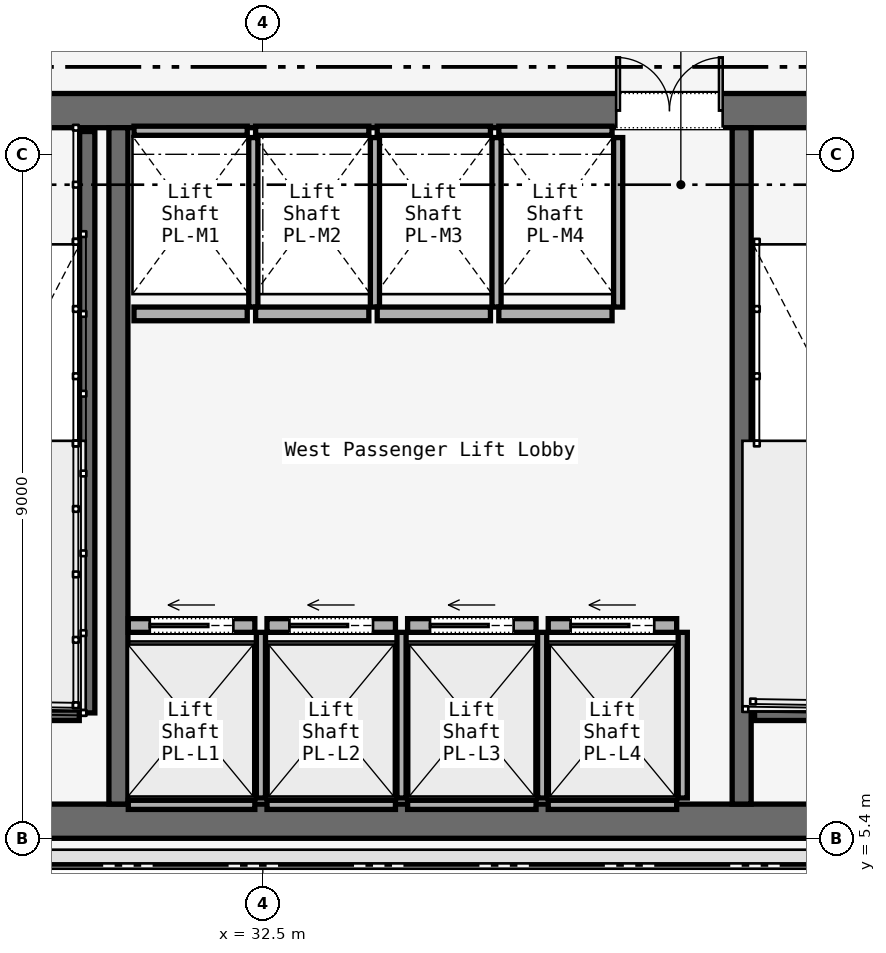
"""IFC4 building model, lengths in metres.
Left out: names, types, materials, properties, quantities, classifications, styles, units other than length and angle.
Written with IfcOpenShell. Run it as: python <this file> out.ifc"""

import sys

from ifc_helpers import new_model, si_unit, direction, frame, frame_2d, origin, place, context, subcontext, project, spatial, rectangle, extrude, element, fill, save


model = new_model("IFC4")
c1 = context("Model", 3, precision=1e-05, world=origin(), true_north=direction((0.0, 1.0)))
c2 = subcontext(c1, "Body", "Model", "MODEL_VIEW")
j1 = project(units=[si_unit("LENGTHUNIT", "METRE"), si_unit("PLANEANGLEUNIT", "RADIAN")], contexts=[c1])
p1 = place(None, origin())
s1 = spatial("IfcSite", under=j1, at=p1, CompositionType="ELEMENT")
p2 = place(p1, origin())
s2 = spatial("IfcBuilding", under=s1, at=p2, CompositionType="ELEMENT")
p3 = place(p2, frame((0.0, 0.0, 36.0)))
s3 = spatial("IfcBuildingStorey", under=s2, at=p3, CompositionType="ELEMENT", Elevation=36.0)
p4 = place(p3, frame((26.45, 14.975, 0.0), z_axis=(0.0, 0.0, 1.0), x_axis=(1.0, 0.0, 0.0)))
e1 = element("IfcWall", 1, at=p4, inside=s3, PredefinedType="SOLIDWALL", context=c2, shape_type="SweptSolid", body=[
    extrude(rectangle(XDim=31.1, YDim=0.45, at=frame_2d((15.55, 0.0))), origin(), (0.0, 0.0, 1.0), 3.58),
])
p5 = place(p4, frame((1.65, 0.0, 0.0)))
e2 = element("IfcOpeningElement", 2, at=p5, cuts=e1, PredefinedType="OPENING", context=c2, shape_type="SweptSolid", body=[
    extrude(rectangle(XDim=1.1, YDim=2.2, at=frame_2d((0.55, 1.1))), frame((0.0, 0.225, 0.0), z_axis=(0.0, -1.0, 0.0), x_axis=(1.0, 0.0, 0.0)), (0.0, 0.0, 1.0), 0.45),
])
p6 = place(p4, frame((13.65, 0.0, 0.0)))
e3 = element("IfcOpeningElement", 3, at=p6, cuts=e1, PredefinedType="OPENING", context=c2, shape_type="SweptSolid", body=[
    extrude(rectangle(XDim=1.1, YDim=2.2, at=frame_2d((0.55, 1.1))), frame((0.0, 0.225, 0.0), z_axis=(0.0, -1.0, 0.0), x_axis=(1.0, 0.0, 0.0)), (0.0, 0.0, 1.0), 0.45),
])
p7 = place(p4, frame((25.55, 0.0, 0.0)))
e4 = element("IfcOpeningElement", 4, at=p7, cuts=e1, PredefinedType="OPENING", context=c2, shape_type="SweptSolid", body=[
    extrude(rectangle(XDim=1.1, YDim=2.2, at=frame_2d((0.55, 1.1))), frame((0.0, 0.225, 0.0), z_axis=(0.0, -1.0, 0.0), x_axis=(1.0, 0.0, 0.0)), (0.0, 0.0, 1.0), 0.45),
])
p8 = place(p4, frame((10.7, 0.0, 0.0)))
e5 = element("IfcOpeningElement", 5, at=p8, cuts=e1, PredefinedType="OPENING", context=c2, shape_type="SweptSolid", body=[
    extrude(rectangle(XDim=1.4, YDim=2.2, at=frame_2d((0.7, 1.1))), frame((0.0, 0.225, 0.0), z_axis=(0.0, -1.0, 0.0), x_axis=(1.0, 0.0, 0.0)), (0.0, 0.0, 1.0), 0.45),
])
p9 = place(p4, frame((19.35, 0.0, 0.0)))
e6 = element("IfcOpeningElement", 6, at=p9, cuts=e1, PredefinedType="OPENING", context=c2, shape_type="SweptSolid", body=[
    extrude(rectangle(XDim=1.1, YDim=2.2, at=frame_2d((0.55, 1.1))), frame((0.0, 0.225, 0.0), z_axis=(0.0, -1.0, 0.0), x_axis=(1.0, 0.0, 0.0)), (0.0, 0.0, 1.0), 0.45),
])
p10 = place(p4, frame((21.4, 0.0, 0.0)))
e7 = element("IfcOpeningElement", 7, at=p10, cuts=e1, PredefinedType="OPENING", context=c2, shape_type="SweptSolid", body=[
    extrude(rectangle(XDim=0.9, YDim=2.1, at=frame_2d((0.45, 1.05))), frame((0.0, 0.225, 0.0), z_axis=(0.0, -1.0, 0.0), x_axis=(1.0, 0.0, 0.0)), (0.0, 0.0, 1.0), 0.45),
])
p11 = place(p4, frame((23.35, 0.0, 0.0)))
e8 = element("IfcOpeningElement", 8, at=p11, cuts=e1, PredefinedType="OPENING", context=c2, shape_type="SweptSolid", body=[
    extrude(rectangle(XDim=1.3, YDim=2.3, at=frame_2d((0.65, 1.15))), frame((0.0, 0.225, 0.0), z_axis=(0.0, -1.0, 0.0), x_axis=(1.0, 0.0, 0.0)), (0.0, 0.0, 1.0), 0.45),
])
p12 = place(p3, frame((26.45, 5.625, 0.0), z_axis=(0.0, 0.0, 1.0), x_axis=(1.0, 0.0, 0.0)))
e9 = element("IfcWall", 9, at=p12, inside=s3, PredefinedType="SOLIDWALL", context=c2, shape_type="SweptSolid", body=[
    extrude(rectangle(XDim=31.1, YDim=0.45, at=frame_2d((15.55, 0.0))), origin(), (0.0, 0.0, 1.0), 3.58),
])
for number, where, z_axis, x_axis in (
    (10, (30.6, 5.85, 0.0), (0.0, 0.0, 1.0), (0.0, 1.0, 0.0)),
    (11, (38.8, 5.85, 0.0), (0.0, 0.0, 1.0), (0.0, 1.0, 0.0)),
):
    element("IfcWall", number, at=place(p3, frame(where, z_axis=z_axis, x_axis=x_axis)), inside=s3, PredefinedType="SOLIDWALL", context=c2, shape_type="SweptSolid", body=[
        extrude(rectangle(XDim=8.9, YDim=0.25, at=frame_2d((4.45, 0.0))), origin(), (0.0, 0.0, 1.0), 3.58),
    ])
p13 = place(p3, frame((30.19, 14.7, 0.0), z_axis=(0.0, 0.0, 1.0), x_axis=(0.0, -1.0, 0.0)))
e12 = element("IfcWall", 12, at=p13, inside=s3, PredefinedType="SOLIDWALL", context=c2, shape_type="SweptSolid", body=[
    extrude(rectangle(XDim=7.65, YDim=0.2, at=frame_2d((3.825, 0.0))), origin(), (0.0, 0.0, 1.0), 3.8),
])
for number, where, z_axis, x_axis in (
    (13, (26.97, 7.05, 0.0), (0.0, 0.0, 1.0), (1.0, 0.0, 0.0)),
    (14, (38.97, 7.05, 0.0), (0.0, 0.0, 1.0), (1.0, 0.0, 0.0)),
):
    element("IfcWall", number, at=place(p3, frame(where, z_axis=z_axis, x_axis=x_axis)), inside=s3, PredefinedType="SOLIDWALL", context=c2, shape_type="SweptSolid", body=[
        extrude(rectangle(XDim=3.115, YDim=0.2, at=frame_2d((1.558, 0.0))), origin(), (0.0, 0.0, 1.0), 3.8),
    ])
p14 = place(p3, frame((30.73, 8.2, 0.0), z_axis=(0.0, 0.0, 1.0), x_axis=(1.0, 0.0, 0.0)))
e15 = element("IfcWall", 15, at=p14, inside=s3, PredefinedType="SOLIDWALL", context=c2, shape_type="SweptSolid", body=[
    extrude(rectangle(XDim=1.665, YDim=0.18, at=frame_2d((0.833, 0.0))), origin(), (0.0, 0.0, 1.0), 2.933),
])
p15 = place(p14, frame((0.282, 0.0, 0.0)))
e16 = element("IfcOpeningElement", 16, at=p15, cuts=e15, PredefinedType="OPENING", context=c2, shape_type="SweptSolid", body=[
    extrude(rectangle(XDim=1.1, YDim=2.2, at=frame_2d((0.55, 1.1))), frame((0.0, 0.09, 0.0), z_axis=(0.0, -1.0, 0.0), x_axis=(1.0, 0.0, 0.0)), (0.0, 0.0, 1.0), 0.18),
])
p16 = place(p3, frame((30.73, 5.84, 0.0), z_axis=(0.0, 0.0, 1.0), x_axis=(1.0, 0.0, 0.0)))
e17 = element("IfcWall", 17, at=p16, inside=s3, PredefinedType="SOLIDWALL", context=c2, shape_type="SweptSolid", body=[
    extrude(rectangle(XDim=1.665, YDim=0.12, at=frame_2d((0.833, 0.0))), origin(), (0.0, 0.0, 1.0), 2.933),
])
p17 = place(p3, frame((32.475, 5.93, 0.0), z_axis=(0.0, 0.0, 1.0), x_axis=(0.0, 1.0, 0.0)))
e18 = element("IfcWall", 18, at=p17, inside=s3, PredefinedType="SOLIDWALL", context=c2, shape_type="SweptSolid", body=[
    extrude(rectangle(XDim=2.18, YDim=0.12, at=frame_2d((1.09, 0.0))), origin(), (0.0, 0.0, 1.0), 2.933),
])
p18 = place(p3, frame((32.555, 8.2, 0.0), z_axis=(0.0, 0.0, 1.0), x_axis=(1.0, 0.0, 0.0)))
e19 = element("IfcWall", 19, at=p18, inside=s3, PredefinedType="SOLIDWALL", context=c2, shape_type="SweptSolid", body=[
    extrude(rectangle(XDim=1.69, YDim=0.18, at=frame_2d((0.845, 0.0))), origin(), (0.0, 0.0, 1.0), 2.933),
])
p19 = place(p18, frame((0.295, 0.0, 0.0)))
e20 = element("IfcOpeningElement", 20, at=p19, cuts=e19, PredefinedType="OPENING", context=c2, shape_type="SweptSolid", body=[
    extrude(rectangle(XDim=1.1, YDim=2.2, at=frame_2d((0.55, 1.1))), frame((0.0, 0.09, 0.0), z_axis=(0.0, -1.0, 0.0), x_axis=(1.0, 0.0, 0.0)), (0.0, 0.0, 1.0), 0.18),
])
p20 = place(p3, frame((32.555, 5.84, 0.0), z_axis=(0.0, 0.0, 1.0), x_axis=(1.0, 0.0, 0.0)))
e21 = element("IfcWall", 21, at=p20, inside=s3, PredefinedType="SOLIDWALL", context=c2, shape_type="SweptSolid", body=[
    extrude(rectangle(XDim=1.69, YDim=0.12, at=frame_2d((0.845, 0.0))), origin(), (0.0, 0.0, 1.0), 2.933),
])
p21 = place(p3, frame((34.325, 5.93, 0.0), z_axis=(0.0, 0.0, 1.0), x_axis=(0.0, 1.0, 0.0)))
e22 = element("IfcWall", 22, at=p21, inside=s3, PredefinedType="SOLIDWALL", context=c2, shape_type="SweptSolid", body=[
    extrude(rectangle(XDim=2.18, YDim=0.12, at=frame_2d((1.09, 0.0))), origin(), (0.0, 0.0, 1.0), 2.933),
])
p22 = place(p3, frame((34.405, 8.2, 0.0), z_axis=(0.0, 0.0, 1.0), x_axis=(1.0, 0.0, 0.0)))
e23 = element("IfcWall", 23, at=p22, inside=s3, PredefinedType="SOLIDWALL", context=c2, shape_type="SweptSolid", body=[
    extrude(rectangle(XDim=1.69, YDim=0.18, at=frame_2d((0.845, 0.0))), origin(), (0.0, 0.0, 1.0), 2.933),
])
p23 = place(p22, frame((0.295, 0.0, 0.0)))
e24 = element("IfcOpeningElement", 24, at=p23, cuts=e23, PredefinedType="OPENING", context=c2, shape_type="SweptSolid", body=[
    extrude(rectangle(XDim=1.1, YDim=2.2, at=frame_2d((0.55, 1.1))), frame((0.0, 0.09, 0.0), z_axis=(0.0, -1.0, 0.0), x_axis=(1.0, 0.0, 0.0)), (0.0, 0.0, 1.0), 0.18),
])
p24 = place(p3, frame((34.405, 5.84, 0.0), z_axis=(0.0, 0.0, 1.0), x_axis=(1.0, 0.0, 0.0)))
e25 = element("IfcWall", 25, at=p24, inside=s3, PredefinedType="SOLIDWALL", context=c2, shape_type="SweptSolid", body=[
    extrude(rectangle(XDim=1.69, YDim=0.12, at=frame_2d((0.845, 0.0))), origin(), (0.0, 0.0, 1.0), 2.933),
])
p25 = place(p3, frame((36.175, 5.93, 0.0), z_axis=(0.0, 0.0, 1.0), x_axis=(0.0, 1.0, 0.0)))
e26 = element("IfcWall", 26, at=p25, inside=s3, PredefinedType="SOLIDWALL", context=c2, shape_type="SweptSolid", body=[
    extrude(rectangle(XDim=2.18, YDim=0.12, at=frame_2d((1.09, 0.0))), origin(), (0.0, 0.0, 1.0), 2.933),
])
p26 = place(p3, frame((36.255, 8.2, 0.0), z_axis=(0.0, 0.0, 1.0), x_axis=(1.0, 0.0, 0.0)))
e27 = element("IfcWall", 27, at=p26, inside=s3, PredefinedType="SOLIDWALL", context=c2, shape_type="SweptSolid", body=[
    extrude(rectangle(XDim=1.69, YDim=0.18, at=frame_2d((0.845, 0.0))), origin(), (0.0, 0.0, 1.0), 2.933),
])
p27 = place(p26, frame((0.295, 0.0, 0.0)))
e28 = element("IfcOpeningElement", 28, at=p27, cuts=e27, PredefinedType="OPENING", context=c2, shape_type="SweptSolid", body=[
    extrude(rectangle(XDim=1.1, YDim=2.2, at=frame_2d((0.55, 1.1))), frame((0.0, 0.09, 0.0), z_axis=(0.0, -1.0, 0.0), x_axis=(1.0, 0.0, 0.0)), (0.0, 0.0, 1.0), 0.18),
])
p28 = place(p3, frame((36.255, 5.84, 0.0), z_axis=(0.0, 0.0, 1.0), x_axis=(1.0, 0.0, 0.0)))
e29 = element("IfcWall", 29, at=p28, inside=s3, PredefinedType="SOLIDWALL", context=c2, shape_type="SweptSolid", body=[
    extrude(rectangle(XDim=1.69, YDim=0.12, at=frame_2d((0.845, 0.0))), origin(), (0.0, 0.0, 1.0), 2.933),
])
p29 = place(p3, frame((38.025, 5.93, 0.0), z_axis=(0.0, 0.0, 1.0), x_axis=(0.0, 1.0, 0.0)))
e30 = element("IfcWall", 30, at=p29, inside=s3, PredefinedType="SOLIDWALL", context=c2, shape_type="SweptSolid", body=[
    extrude(rectangle(XDim=2.18, YDim=0.12, at=frame_2d((1.09, 0.0))), origin(), (0.0, 0.0, 1.0), 2.933),
])
p30 = place(p3, frame((30.805, 12.3, 0.0), z_axis=(0.0, 0.0, 1.0), x_axis=(1.0, 0.0, 0.0)))
e31 = element("IfcWall", 31, at=p30, inside=s3, PredefinedType="SOLIDWALL", context=c2, shape_type="SweptSolid", body=[
    extrude(rectangle(XDim=1.49, YDim=0.18, at=frame_2d((0.745, 0.0))), origin(), (0.0, 0.0, 1.0), 2.933),
])
p31 = place(p3, frame((30.805, 14.71, 0.0), z_axis=(0.0, 0.0, 1.0), x_axis=(1.0, 0.0, 0.0)))
e32 = element("IfcWall", 32, at=p31, inside=s3, PredefinedType="SOLIDWALL", context=c2, shape_type="SweptSolid", body=[
    extrude(rectangle(XDim=1.49, YDim=0.12, at=frame_2d((0.745, 0.0))), origin(), (0.0, 0.0, 1.0), 2.933),
])
p32 = place(p3, frame((32.375, 12.39, 0.0), z_axis=(0.0, 0.0, 1.0), x_axis=(0.0, 1.0, 0.0)))
e33 = element("IfcWall", 33, at=p32, inside=s3, PredefinedType="SOLIDWALL", context=c2, shape_type="SweptSolid", body=[
    extrude(rectangle(XDim=2.23, YDim=0.12, at=frame_2d((1.115, 0.0))), origin(), (0.0, 0.0, 1.0), 2.933),
])
p33 = place(p3, frame((32.405, 12.3, 0.0), z_axis=(0.0, 0.0, 1.0), x_axis=(1.0, 0.0, 0.0)))
e34 = element("IfcWall", 34, at=p33, inside=s3, PredefinedType="SOLIDWALL", context=c2, shape_type="SweptSolid", body=[
    extrude(rectangle(XDim=1.49, YDim=0.18, at=frame_2d((0.745, 0.0))), origin(), (0.0, 0.0, 1.0), 2.933),
])
p34 = place(p3, frame((32.405, 14.71, 0.0), z_axis=(0.0, 0.0, 1.0), x_axis=(1.0, 0.0, 0.0)))
e35 = element("IfcWall", 35, at=p34, inside=s3, PredefinedType="SOLIDWALL", context=c2, shape_type="SweptSolid", body=[
    extrude(rectangle(XDim=1.49, YDim=0.12, at=frame_2d((0.745, 0.0))), origin(), (0.0, 0.0, 1.0), 2.933),
])
p35 = place(p3, frame((33.975, 12.39, 0.0), z_axis=(0.0, 0.0, 1.0), x_axis=(0.0, 1.0, 0.0)))
e36 = element("IfcWall", 36, at=p35, inside=s3, PredefinedType="SOLIDWALL", context=c2, shape_type="SweptSolid", body=[
    extrude(rectangle(XDim=2.23, YDim=0.12, at=frame_2d((1.115, 0.0))), origin(), (0.0, 0.0, 1.0), 2.933),
])
p36 = place(p3, frame((34.005, 12.3, 0.0), z_axis=(0.0, 0.0, 1.0), x_axis=(1.0, 0.0, 0.0)))
e37 = element("IfcWall", 37, at=p36, inside=s3, PredefinedType="SOLIDWALL", context=c2, shape_type="SweptSolid", body=[
    extrude(rectangle(XDim=1.49, YDim=0.18, at=frame_2d((0.745, 0.0))), origin(), (0.0, 0.0, 1.0), 2.933),
])
p37 = place(p3, frame((34.005, 14.71, 0.0), z_axis=(0.0, 0.0, 1.0), x_axis=(1.0, 0.0, 0.0)))
e38 = element("IfcWall", 38, at=p37, inside=s3, PredefinedType="SOLIDWALL", context=c2, shape_type="SweptSolid", body=[
    extrude(rectangle(XDim=1.49, YDim=0.12, at=frame_2d((0.745, 0.0))), origin(), (0.0, 0.0, 1.0), 2.933),
])
p38 = place(p3, frame((35.575, 12.39, 0.0), z_axis=(0.0, 0.0, 1.0), x_axis=(0.0, 1.0, 0.0)))
e39 = element("IfcWall", 39, at=p38, inside=s3, PredefinedType="SOLIDWALL", context=c2, shape_type="SweptSolid", body=[
    extrude(rectangle(XDim=2.23, YDim=0.12, at=frame_2d((1.115, 0.0))), origin(), (0.0, 0.0, 1.0), 2.933),
])
p39 = place(p3, frame((35.605, 12.3, 0.0), z_axis=(0.0, 0.0, 1.0), x_axis=(1.0, 0.0, 0.0)))
e40 = element("IfcWall", 40, at=p39, inside=s3, PredefinedType="SOLIDWALL", context=c2, shape_type="SweptSolid", body=[
    extrude(rectangle(XDim=1.49, YDim=0.18, at=frame_2d((0.745, 0.0))), origin(), (0.0, 0.0, 1.0), 2.933),
])
p40 = place(p3, frame((35.605, 14.71, 0.0), z_axis=(0.0, 0.0, 1.0), x_axis=(1.0, 0.0, 0.0)))
e41 = element("IfcWall", 41, at=p40, inside=s3, PredefinedType="SOLIDWALL", context=c2, shape_type="SweptSolid", body=[
    extrude(rectangle(XDim=1.49, YDim=0.12, at=frame_2d((0.745, 0.0))), origin(), (0.0, 0.0, 1.0), 2.933),
])
p41 = place(p3, frame((37.175, 12.39, 0.0), z_axis=(0.0, 0.0, 1.0), x_axis=(0.0, 1.0, 0.0)))
e42 = element("IfcWall", 42, at=p41, inside=s3, PredefinedType="SOLIDWALL", context=c2, shape_type="SweptSolid", body=[
    extrude(rectangle(XDim=2.23, YDim=0.12, at=frame_2d((1.115, 0.0))), origin(), (0.0, 0.0, 1.0), 2.933),
])
p42 = place(p8, origin())
e43 = element("IfcDoor", 43, at=p42, inside=s3, OperationType="DOUBLE_DOOR_SINGLE_SWING", PredefinedType="DOOR", context=c2, shape_type="SweptSolid", body=[
    extrude(rectangle(XDim=1.4, YDim=2.2, at=frame_2d((0.7, 1.1))), frame((0.0, 0.025, 0.0), z_axis=(0.0, -1.0, 0.0), x_axis=(1.0, 0.0, 0.0)), (0.0, 0.0, 1.0), 0.05),
])
fill(e5, e43)
p43 = place(p15, origin())
e44 = element("IfcDoor", 44, at=p43, inside=s3, OperationType="SLIDING_TO_LEFT", PredefinedType="DOOR", context=c2, shape_type="SweptSolid", body=[
    extrude(rectangle(XDim=1.1, YDim=2.2, at=frame_2d((0.55, 1.1))), frame((0.0, 0.025, 0.0), z_axis=(0.0, -1.0, 0.0), x_axis=(1.0, 0.0, 0.0)), (0.0, 0.0, 1.0), 0.05),
])
fill(e16, e44)
p44 = place(p19, origin())
e45 = element("IfcDoor", 45, at=p44, inside=s3, OperationType="SLIDING_TO_LEFT", PredefinedType="DOOR", context=c2, shape_type="SweptSolid", body=[
    extrude(rectangle(XDim=1.1, YDim=2.2, at=frame_2d((0.55, 1.1))), frame((0.0, 0.025, 0.0), z_axis=(0.0, -1.0, 0.0), x_axis=(1.0, 0.0, 0.0)), (0.0, 0.0, 1.0), 0.05),
])
fill(e20, e45)
p45 = place(p23, origin())
e46 = element("IfcDoor", 46, at=p45, inside=s3, OperationType="SLIDING_TO_LEFT", PredefinedType="DOOR", context=c2, shape_type="SweptSolid", body=[
    extrude(rectangle(XDim=1.1, YDim=2.2, at=frame_2d((0.55, 1.1))), frame((0.0, 0.025, 0.0), z_axis=(0.0, -1.0, 0.0), x_axis=(1.0, 0.0, 0.0)), (0.0, 0.0, 1.0), 0.05),
])
fill(e24, e46)
p46 = place(p27, origin())
e47 = element("IfcDoor", 47, at=p46, inside=s3, OperationType="SLIDING_TO_LEFT", PredefinedType="DOOR", context=c2, shape_type="SweptSolid", body=[
    extrude(rectangle(XDim=1.1, YDim=2.2, at=frame_2d((0.55, 1.1))), frame((0.0, 0.025, 0.0), z_axis=(0.0, -1.0, 0.0), x_axis=(1.0, 0.0, 0.0)), (0.0, 0.0, 1.0), 0.05),
])
fill(e28, e47)
save(model, sys.argv[1])
